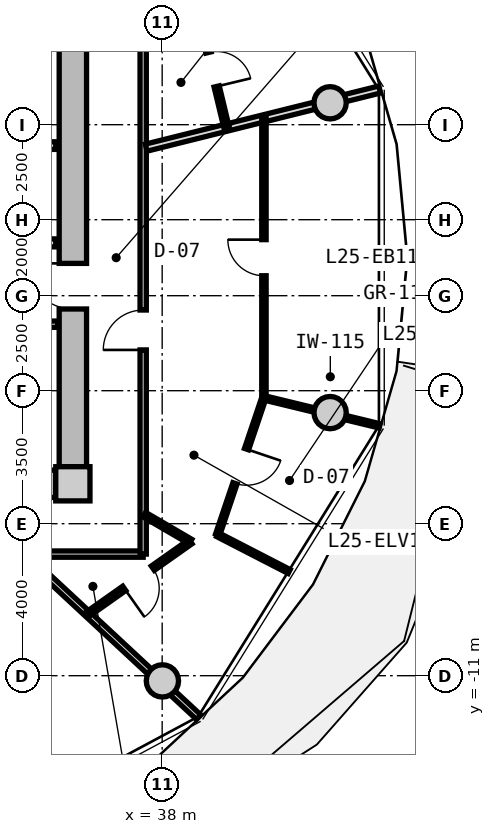
"""IFC4 building model, lengths in metres.
Left out: names, types, materials, properties, quantities, classifications, styles, units other than length and angle.
Written with IfcOpenShell. Run it as: python <this file> out.ifc"""

import sys

from ifc_helpers import new_model, si_unit, direction, frame, frame_2d, origin, origin_2d, place, context, subcontext, project, spatial, rectangle, circle, extrude, source, transform, mapped, element, fill, save


model = new_model("IFC4")
c1 = context("Model", 3, precision=1e-05, world=origin(), true_north=direction((0.0, 1.0)))
c2 = subcontext(c1, "Body", "Model", "MODEL_VIEW")
j1 = project(units=[si_unit("LENGTHUNIT", "METRE"), si_unit("PLANEANGLEUNIT", "RADIAN")], contexts=[c1])
p1 = place(None, origin())
s1 = spatial("IfcSite", under=j1, at=p1, CompositionType="ELEMENT")
p2 = place(p1, origin())
s2 = spatial("IfcBuilding", under=s1, at=p2, CompositionType="ELEMENT")
p3 = place(p2, frame((0.0, 0.0, 84.05)))
s3 = spatial("IfcBuildingStorey", under=s2, at=p3, CompositionType="ELEMENT", Elevation=84.05)
m1 = source(origin(), c2, "Body", "SweptSolid", [
    extrude(rectangle(XDim=0.9, YDim=0.9, at=origin_2d()), origin(), (0.0, 0.0, 1.0), 3.05),
])
p4 = place(p3, frame((35.65, -5.95, 0.0), z_axis=(0.0, 0.0, 1.0), x_axis=(1.0, 0.0, 0.0)))
e1 = element("IfcColumn", 1, at=p4, inside=s3, PredefinedType="COLUMN", context=c2, shape_type="MappedRepresentation", body=[
    mapped(m1, transform((0.0, 0.0, 0.0), x_axis=(1.0, 0.0, 0.0), y_axis=(0.0, 1.0, 0.0), z_axis=(0.0, 0.0, 1.0), scale=1.0)),
])
m2 = source(origin(), c2, "Body", "SweptSolid", [
    extrude(rectangle(XDim=14.4, YDim=0.72, at=frame_2d((7.2, 0.0))), origin(), (0.0, 0.0, 1.0), 2.79),
])
p5 = place(p3, frame((35.2, -5.95, 0.0), z_axis=(0.0, 0.0, 1.0), x_axis=(-1.0, 0.0, 0.0)))
e2 = element("IfcWall", 2, at=p5, inside=s3, PredefinedType="SHEAR", context=c2, shape_type="MappedRepresentation", body=[
    mapped(m2, transform((0.0, 0.0, 0.0), x_axis=(1.0, 0.0, 0.0), y_axis=(0.0, 1.0, 0.0), z_axis=(0.0, 0.0, 1.0), scale=1.0)),
])
m3 = source(origin(), c2, "Body", "SweptSolid", [
    extrude(rectangle(XDim=11.0, YDim=0.72, at=frame_2d((5.5, 0.0))), origin(), (0.0, 0.0, 1.0), 2.79),
])
p6 = place(p3, frame((35.65, 5.5, 0.0), z_axis=(0.0, 0.0, 1.0), x_axis=(0.0, -1.0, 0.0)))
e3 = element("IfcWall", 3, at=p6, inside=s3, PredefinedType="SHEAR", context=c2, shape_type="MappedRepresentation", body=[
    mapped(m3, transform((0.0, 0.0, 0.0), x_axis=(1.0, 0.0, 0.0), y_axis=(0.0, 1.0, 0.0), z_axis=(0.0, 0.0, 1.0), scale=1.0)),
])
p7 = place(p6, frame((5.65, 0.0, 0.0)))
e4 = element("IfcOpeningElement", 4, at=p7, cuts=e3, PredefinedType="OPENING", context=c2, shape_type="SweptSolid", body=[
    extrude(rectangle(XDim=1.2, YDim=2.15, at=frame_2d((0.6, 1.075))), frame((0.0, 0.37, 0.0), z_axis=(0.0, -1.0, 0.0), x_axis=(1.0, 0.0, 0.0)), (0.0, 0.0, 1.0), 0.74),
])
m4 = source(origin(), c2, "Body", "SweptSolid", [
    extrude(circle(Radius=0.425, at=origin_2d()), origin(), (0.0, 0.0, 1.0), 3.05),
])
for number, where, z_axis, x_axis in (
    (5, (42.419, 4.076, 0.0), (0.0, 0.0, 1.0), (1.0, 0.0, 0.0)),
    (6, (38.006, -11.137, 0.0), (0.0, 0.0, 1.0), (1.0, 0.0, 0.0)),
    (7, (42.419, -4.076, 0.0), (0.0, 0.0, 1.0), (1.0, 0.0, 0.0)),
):
    element("IfcColumn", number, at=place(p3, frame(where, z_axis=z_axis, x_axis=x_axis)), inside=s3, PredefinedType="COLUMN", context=c2, shape_type="MappedRepresentation", body=[
        mapped(m4, transform((0.0, 0.0, 0.0), x_axis=(1.0, 0.0, 0.0), y_axis=(0.0, 1.0, 0.0), z_axis=(0.0, 0.0, 1.0), scale=1.0)),
    ])
m5 = source(origin(), c2, "Body", "SweptSolid", [
    extrude(rectangle(XDim=3.2, YDim=0.2, at=frame_2d((1.6, 0.0))), origin(), (0.0, 0.0, 1.0), 2.775),
])
p8 = place(p3, frame((32.0, 2.95, 0.0), z_axis=(0.0, 0.0, 1.0), x_axis=(1.0, 0.0, 0.0)))
e8 = element("IfcWall", 8, at=p8, inside=s3, PredefinedType="PARTITIONING", context=c2, shape_type="MappedRepresentation", body=[
    mapped(m5, transform((0.0, 0.0, 0.0), x_axis=(1.0, 0.0, 0.0), y_axis=(0.0, 1.0, 0.0), z_axis=(0.0, 0.0, 1.0), scale=1.0)),
])
m6 = source(origin(), c2, "Body", "SweptSolid", [
    extrude(rectangle(XDim=6.66, YDim=0.21, at=frame_2d((3.33, 0.0))), origin(), (0.0, 0.0, 1.0), 2.775),
])
p9 = place(p3, frame((28.54, 0.39, 0.0), z_axis=(0.0, 0.0, 1.0), x_axis=(1.0, 0.0, 0.0)))
e9 = element("IfcWall", 9, at=p9, inside=s3, PredefinedType="PARTITIONING", context=c2, shape_type="MappedRepresentation", body=[
    mapped(m6, transform((0.0, 0.0, 0.0), x_axis=(1.0, 0.0, 0.0), y_axis=(0.0, 1.0, 0.0), z_axis=(0.0, 0.0, 1.0), scale=1.0)),
])
p10 = place(p9, frame((1.0, 0.0, 0.0)))
e10 = element("IfcOpeningElement", 10, at=p10, cuts=e9, PredefinedType="OPENING", context=c2, shape_type="SweptSolid", body=[
    extrude(rectangle(XDim=1.2, YDim=2.15, at=frame_2d((0.6, 1.075))), frame((0.0, 0.115, 0.0), z_axis=(0.0, -1.0, 0.0), x_axis=(1.0, 0.0, 0.0)), (0.0, 0.0, 1.0), 0.23),
])
m7 = source(origin(), c2, "Body", "SweptSolid", [
    extrude(rectangle(XDim=2.7, YDim=0.165, at=frame_2d((1.35, 0.0))), origin(), (0.0, 0.0, 1.0), 2.775),
])
p11 = place(p3, frame((32.55, -1.75, 0.0), z_axis=(0.0, 0.0, 1.0), x_axis=(1.0, 0.0, 0.0)))
e11 = element("IfcWall", 11, at=p11, inside=s3, PredefinedType="PARTITIONING", context=c2, shape_type="MappedRepresentation", body=[
    mapped(m7, transform((0.0, 0.0, 0.0), x_axis=(1.0, 0.0, 0.0), y_axis=(0.0, 1.0, 0.0), z_axis=(0.0, 0.0, 1.0), scale=1.0)),
])
p12 = place(p11, frame((0.85, 0.0, 0.0)))
e12 = element("IfcOpeningElement", 12, at=p12, cuts=e11, PredefinedType="OPENING", context=c2, shape_type="SweptSolid", body=[
    extrude(rectangle(XDim=0.925, YDim=2.1, at=frame_2d((0.462, 1.05))), frame((0.0, 0.093, 0.0), z_axis=(0.0, -1.0, 0.0), x_axis=(1.0, 0.0, 0.0)), (0.0, 0.0, 1.0), 0.185),
])
m8 = source(origin(), c2, "Body", "SweptSolid", [
    extrude(rectangle(XDim=8.6, YDim=0.165, at=frame_2d((4.3, 0.0))), origin(), (0.0, 0.0, 1.0), 2.775),
])
p13 = place(p3, frame((37.5, -7.8, 0.0), z_axis=(0.0, 0.0, 1.0), x_axis=(-1.0, 0.0, 0.0)))
e13 = element("IfcWall", 13, at=p13, inside=s3, PredefinedType="PARTITIONING", context=c2, shape_type="MappedRepresentation", body=[
    mapped(m8, transform((0.0, 0.0, 0.0), x_axis=(1.0, 0.0, 0.0), y_axis=(0.0, 1.0, 0.0), z_axis=(0.0, 0.0, 1.0), scale=1.0)),
])
m9 = source(origin(), c2, "Body", "SweptSolid", [
    extrude(rectangle(XDim=15.6, YDim=0.165, at=frame_2d((7.8, 0.0))), origin(), (0.0, 0.0, 1.0), 2.775),
])
p14 = place(p3, frame((37.5, 7.8, 0.0), z_axis=(0.0, 0.0, 1.0), x_axis=(0.0, -1.0, 0.0)))
e14 = element("IfcWall", 14, at=p14, inside=s3, PredefinedType="PARTITIONING", context=c2, shape_type="MappedRepresentation", body=[
    mapped(m9, transform((0.0, 0.0, 0.0), x_axis=(1.0, 0.0, 0.0), y_axis=(0.0, 1.0, 0.0), z_axis=(0.0, 0.0, 1.0), scale=1.0)),
])
p15 = place(p14, frame((9.177, 0.0, 0.0)))
e15 = element("IfcOpeningElement", 15, at=p15, cuts=e14, PredefinedType="OPENING", context=c2, shape_type="SweptSolid", body=[
    extrude(rectangle(XDim=1.05, YDim=2.15, at=frame_2d((0.525, 1.075))), frame((0.0, 0.093, 0.0), z_axis=(0.0, -1.0, 0.0), x_axis=(1.0, 0.0, 0.0)), (0.0, 0.0, 1.0), 0.185),
])
m10 = source(origin(), c2, "Body", "SweptSolid", [
    extrude(rectangle(XDim=6.187, YDim=0.165, at=frame_2d((3.093, 0.0))), origin(), (0.0, 0.0, 1.0), 2.275),
])
p16 = place(p3, frame((34.429, -7.88, 0.0), z_axis=(0.0, 0.0, 1.0), x_axis=(0.732501077882, -0.680765870841, 0.0)))
e16 = element("IfcWall", 16, at=p16, inside=s3, PredefinedType="PARTITIONING", context=c2, shape_type="MappedRepresentation", body=[
    mapped(m10, transform((0.0, 0.0, 0.0), x_axis=(1.0, 0.0, 0.0), y_axis=(0.0, 1.0, 0.0), z_axis=(0.0, 0.0, 1.0), scale=1.0)),
])
m11 = source(origin(), c2, "Body", "SweptSolid", [
    extrude(rectangle(XDim=6.331, YDim=0.19, at=frame_2d((3.165, 0.0))), origin(), (0.0, 0.0, 1.0), 2.275),
])
p17 = place(p3, frame((37.58, 2.896, 0.0), z_axis=(0.0, 0.0, 1.0), x_axis=(0.97036440661, 0.241646267062, 0.0)))
e17 = element("IfcWall", 17, at=p17, inside=s3, PredefinedType="PARTITIONING", context=c2, shape_type="MappedRepresentation", body=[
    mapped(m11, transform((0.0, 0.0, 0.0), x_axis=(1.0, 0.0, 0.0), y_axis=(0.0, 1.0, 0.0), z_axis=(0.0, 0.0, 1.0), scale=1.0)),
])
m12 = source(origin(), c2, "Body", "SweptSolid", [
    extrude(rectangle(XDim=7.375, YDim=0.115, at=frame_2d((3.688, 0.0))), origin(), (0.0, 0.0, 1.0), 2.775),
])
p18 = place(p3, frame((40.678, -3.688, 0.0), z_axis=(0.0, 0.0, 1.0), x_axis=(0.0, 1.0, 0.0)))
e18 = element("IfcWall", 18, at=p18, inside=s3, PredefinedType="PARTITIONING", context=c2, shape_type="MappedRepresentation", body=[
    mapped(m12, transform((0.0, 0.0, 0.0), x_axis=(1.0, 0.0, 0.0), y_axis=(0.0, 1.0, 0.0), z_axis=(0.0, 0.0, 1.0), scale=1.0)),
])
p19 = place(p18, frame((3.213, 0.0, 0.0)))
e19 = element("IfcOpeningElement", 19, at=p19, cuts=e18, PredefinedType="OPENING", context=c2, shape_type="SweptSolid", body=[
    extrude(rectangle(XDim=0.95, YDim=2.1, at=frame_2d((0.475, 1.05))), frame((0.0, 0.067, 0.0), z_axis=(0.0, -1.0, 0.0), x_axis=(1.0, 0.0, 0.0)), (0.0, 0.0, 1.0), 0.135),
])
m13 = source(origin(), c2, "Body", "SweptSolid", [
    extrude(rectangle(XDim=3.133, YDim=0.115, at=frame_2d((1.567, 0.0))), origin(), (0.0, 0.0, 1.0), 2.275),
])
p20 = place(p3, frame((40.678, -3.688, 0.0), z_axis=(0.0, 0.0, 1.0), x_axis=(0.971863619682, -0.235544273414, 0.0)))
e20 = element("IfcWall", 20, at=p20, inside=s3, PredefinedType="PARTITIONING", context=c2, shape_type="MappedRepresentation", body=[
    mapped(m13, transform((0.0, 0.0, 0.0), x_axis=(1.0, 0.0, 0.0), y_axis=(0.0, 1.0, 0.0), z_axis=(0.0, 0.0, 1.0), scale=1.0)),
])
m14 = source(origin(), c2, "Body", "SweptSolid", [
    extrude(rectangle(XDim=1.407, YDim=0.14, at=frame_2d((0.704, 0.0))), origin(), (0.0, 0.0, 1.0), 2.775),
])
p21 = place(p3, frame((37.53, -6.762, 0.0), z_axis=(0.0, 0.0, 1.0), x_axis=(0.863539718977, -0.504280828258, 0.0)))
e21 = element("IfcWall", 21, at=p21, inside=s3, PredefinedType="PARTITIONING", context=c2, shape_type="MappedRepresentation", body=[
    mapped(m14, transform((0.0, 0.0, 0.0), x_axis=(1.0, 0.0, 0.0), y_axis=(0.0, 1.0, 0.0), z_axis=(0.0, 0.0, 1.0), scale=1.0)),
])
m15 = source(origin(), c2, "Body", "SweptSolid", [
    extrude(rectangle(XDim=3.347, YDim=0.14, at=frame_2d((1.673, 0.0))), origin(), (0.0, 0.0, 1.0), 2.775),
])
p22 = place(p3, frame((38.745, -7.472, 0.0), z_axis=(0.0, 0.0, 1.0), x_axis=(-0.81705680263, -0.576557179537, 0.0)))
e22 = element("IfcWall", 22, at=p22, inside=s3, PredefinedType="PARTITIONING", context=c2, shape_type="MappedRepresentation", body=[
    mapped(m15, transform((0.0, 0.0, 0.0), x_axis=(1.0, 0.0, 0.0), y_axis=(0.0, 1.0, 0.0), z_axis=(0.0, 0.0, 1.0), scale=1.0)),
])
p23 = place(p22, frame((1.214, 0.0, 0.0)))
e23 = element("IfcOpeningElement", 23, at=p23, cuts=e22, PredefinedType="OPENING", context=c2, shape_type="SweptSolid", body=[
    extrude(rectangle(XDim=0.92, YDim=2.1, at=frame_2d((0.46, 1.05))), frame((0.0, 0.08, 0.0), z_axis=(0.0, -1.0, 0.0), x_axis=(1.0, 0.0, 0.0)), (0.0, 0.0, 1.0), 0.16),
])
m16 = source(origin(), c2, "Body", "SweptSolid", [
    extrude(rectangle(XDim=2.117, YDim=0.115, at=frame_2d((1.059, 0.0))), origin(), (0.0, 0.0, 1.0), 2.775),
])
p24 = place(p3, frame((39.46, -7.289, 0.0), z_axis=(0.0, 0.0, 1.0), x_axis=(0.888941834945, -0.45802010227, 0.0)))
e24 = element("IfcWall", 24, at=p24, inside=s3, PredefinedType="PARTITIONING", context=c2, shape_type="MappedRepresentation", body=[
    mapped(m16, transform((0.0, 0.0, 0.0), x_axis=(1.0, 0.0, 0.0), y_axis=(0.0, 1.0, 0.0), z_axis=(0.0, 0.0, 1.0), scale=1.0)),
])
m17 = source(origin(), c2, "Body", "SweptSolid", [
    extrude(rectangle(XDim=3.801, YDim=0.115, at=frame_2d((1.901, 0.0))), origin(), (0.0, 0.0, 1.0), 2.775),
])
p25 = place(p3, frame((39.46, -7.289, 0.0), z_axis=(0.0, 0.0, 1.0), x_axis=(0.320097904666, 0.947384468644, 0.0)))
e25 = element("IfcWall", 25, at=p25, inside=s3, PredefinedType="PARTITIONING", context=c2, shape_type="MappedRepresentation", body=[
    mapped(m17, transform((0.0, 0.0, 0.0), x_axis=(1.0, 0.0, 0.0), y_axis=(0.0, 1.0, 0.0), z_axis=(0.0, 0.0, 1.0), scale=1.0)),
])
p26 = place(p25, frame((1.426, 0.0, 0.0)))
e26 = element("IfcOpeningElement", 26, at=p26, cuts=e25, PredefinedType="OPENING", context=c2, shape_type="SweptSolid", body=[
    extrude(rectangle(XDim=0.95, YDim=2.1, at=frame_2d((0.475, 1.05))), frame((0.0, 0.067, 0.0), z_axis=(0.0, -1.0, 0.0), x_axis=(1.0, 0.0, 0.0)), (0.0, 0.0, 1.0), 0.135),
])
m18 = source(origin(), c2, "Body", "SweptSolid", [
    extrude(rectangle(XDim=3.112, YDim=0.14, at=frame_2d((1.556, 0.0))), origin(), (0.0, 0.0, 1.0), 2.415),
])
p27 = place(p3, frame((38.963, 6.466, 0.0), z_axis=(0.0, 0.0, 1.0), x_axis=(0.233737944029, -0.972299631555, 0.0)))
e27 = element("IfcWall", 27, at=p27, inside=s3, PredefinedType="PARTITIONING", context=c2, shape_type="MappedRepresentation", body=[
    mapped(m18, transform((0.0, 0.0, 0.0), x_axis=(1.0, 0.0, 0.0), y_axis=(0.0, 1.0, 0.0), z_axis=(0.0, 0.0, 1.0), scale=1.0)),
])
p28 = place(p27, frame((1.096, 0.0, 0.0)))
e28 = element("IfcOpeningElement", 28, at=p28, cuts=e27, PredefinedType="OPENING", context=c2, shape_type="SweptSolid", body=[
    extrude(rectangle(XDim=0.92, YDim=2.1, at=frame_2d((0.46, 1.05))), frame((0.0, 0.08, 0.0), z_axis=(0.0, -1.0, 0.0), x_axis=(1.0, 0.0, 0.0)), (0.0, 0.0, 1.0), 0.16),
])
m19 = source(origin(), c2, "Body", "SweptSolid", [
    extrude(rectangle(XDim=1.2, YDim=2.15, at=frame_2d((0.6, 1.075))), frame((0.0, 0.025, 0.0), z_axis=(0.0, -1.0, 0.0), x_axis=(1.0, 0.0, 0.0)), (0.0, 0.0, 1.0), 0.05),
])
p29 = place(p7, frame((1.2, 0.0, 0.0), z_axis=(0.0, 0.0, 1.0), x_axis=(-1.0, 0.0, 0.0)))
e29 = element("IfcDoor", 29, at=p29, inside=s3, OperationType="SINGLE_SWING_RIGHT", PredefinedType="DOOR", context=c2, shape_type="MappedRepresentation", body=[
    mapped(m19, transform((0.0, 0.0, 0.0), x_axis=(1.0, 0.0, 0.0), y_axis=(0.0, 1.0, 0.0), z_axis=(0.0, 0.0, 1.0), scale=1.0)),
])
fill(e4, e29)
m20 = source(origin(), c2, "Body", "SweptSolid", [
    extrude(rectangle(XDim=1.05, YDim=2.15, at=frame_2d((0.525, 1.075))), frame((0.0, 0.025, 0.0), z_axis=(0.0, -1.0, 0.0), x_axis=(1.0, 0.0, 0.0)), (0.0, 0.0, 1.0), 0.05),
])
p30 = place(p15, frame((1.05, 0.0, 0.0), z_axis=(0.0, 0.0, 1.0), x_axis=(-1.0, 0.0, 0.0)))
e30 = element("IfcDoor", 30, at=p30, inside=s3, OperationType="SINGLE_SWING_LEFT", PredefinedType="DOOR", context=c2, shape_type="MappedRepresentation", body=[
    mapped(m20, transform((0.0, 0.0, 0.0), x_axis=(1.0, 0.0, 0.0), y_axis=(0.0, 1.0, 0.0), z_axis=(0.0, 0.0, 1.0), scale=1.0)),
])
fill(e15, e30)
m21 = source(origin(), c2, "Body", "SweptSolid", [
    extrude(rectangle(XDim=0.92, YDim=2.1, at=frame_2d((0.46, 1.05))), frame((0.0, 0.025, 0.0), z_axis=(0.0, -1.0, 0.0), x_axis=(1.0, 0.0, 0.0)), (0.0, 0.0, 1.0), 0.05),
])
p31 = place(p23, origin())
e31 = element("IfcDoor", 31, at=p31, inside=s3, OperationType="SINGLE_SWING_RIGHT", PredefinedType="DOOR", context=c2, shape_type="MappedRepresentation", body=[
    mapped(m21, transform((0.0, 0.0, 0.0), x_axis=(1.0, 0.0, 0.0), y_axis=(0.0, 1.0, 0.0), z_axis=(0.0, 0.0, 1.0), scale=1.0)),
])
fill(e23, e31)
m22 = source(origin(), c2, "Body", "SweptSolid", [
    extrude(rectangle(XDim=0.95, YDim=2.1, at=frame_2d((0.475, 1.05))), frame((0.0, 0.025, 0.0), z_axis=(0.0, -1.0, 0.0), x_axis=(1.0, 0.0, 0.0)), (0.0, 0.0, 1.0), 0.05),
])
p32 = place(p26, frame((0.95, 0.0, 0.0), z_axis=(0.0, 0.0, 1.0), x_axis=(-1.0, 0.0, 0.0)))
e32 = element("IfcDoor", 32, at=p32, inside=s3, OperationType="SINGLE_SWING_LEFT", PredefinedType="DOOR", context=c2, shape_type="MappedRepresentation", body=[
    mapped(m22, transform((0.0, 0.0, 0.0), x_axis=(1.0, 0.0, 0.0), y_axis=(0.0, 1.0, 0.0), z_axis=(0.0, 0.0, 1.0), scale=1.0)),
])
fill(e26, e32)
p33 = place(p19, origin())
e33 = element("IfcDoor", 33, at=p33, inside=s3, OperationType="SINGLE_SWING_RIGHT", PredefinedType="DOOR", context=c2, shape_type="MappedRepresentation", body=[
    mapped(m22, transform((0.0, 0.0, 0.0), x_axis=(1.0, 0.0, 0.0), y_axis=(0.0, 1.0, 0.0), z_axis=(0.0, 0.0, 1.0), scale=1.0)),
])
fill(e19, e33)
p34 = place(p28, origin())
e34 = element("IfcDoor", 34, at=p34, inside=s3, OperationType="SINGLE_SWING_RIGHT", PredefinedType="DOOR", context=c2, shape_type="MappedRepresentation", body=[
    mapped(m21, transform((0.0, 0.0, 0.0), x_axis=(1.0, 0.0, 0.0), y_axis=(0.0, 1.0, 0.0), z_axis=(0.0, 0.0, 1.0), scale=1.0)),
])
fill(e28, e34)
save(model, sys.argv[1])
